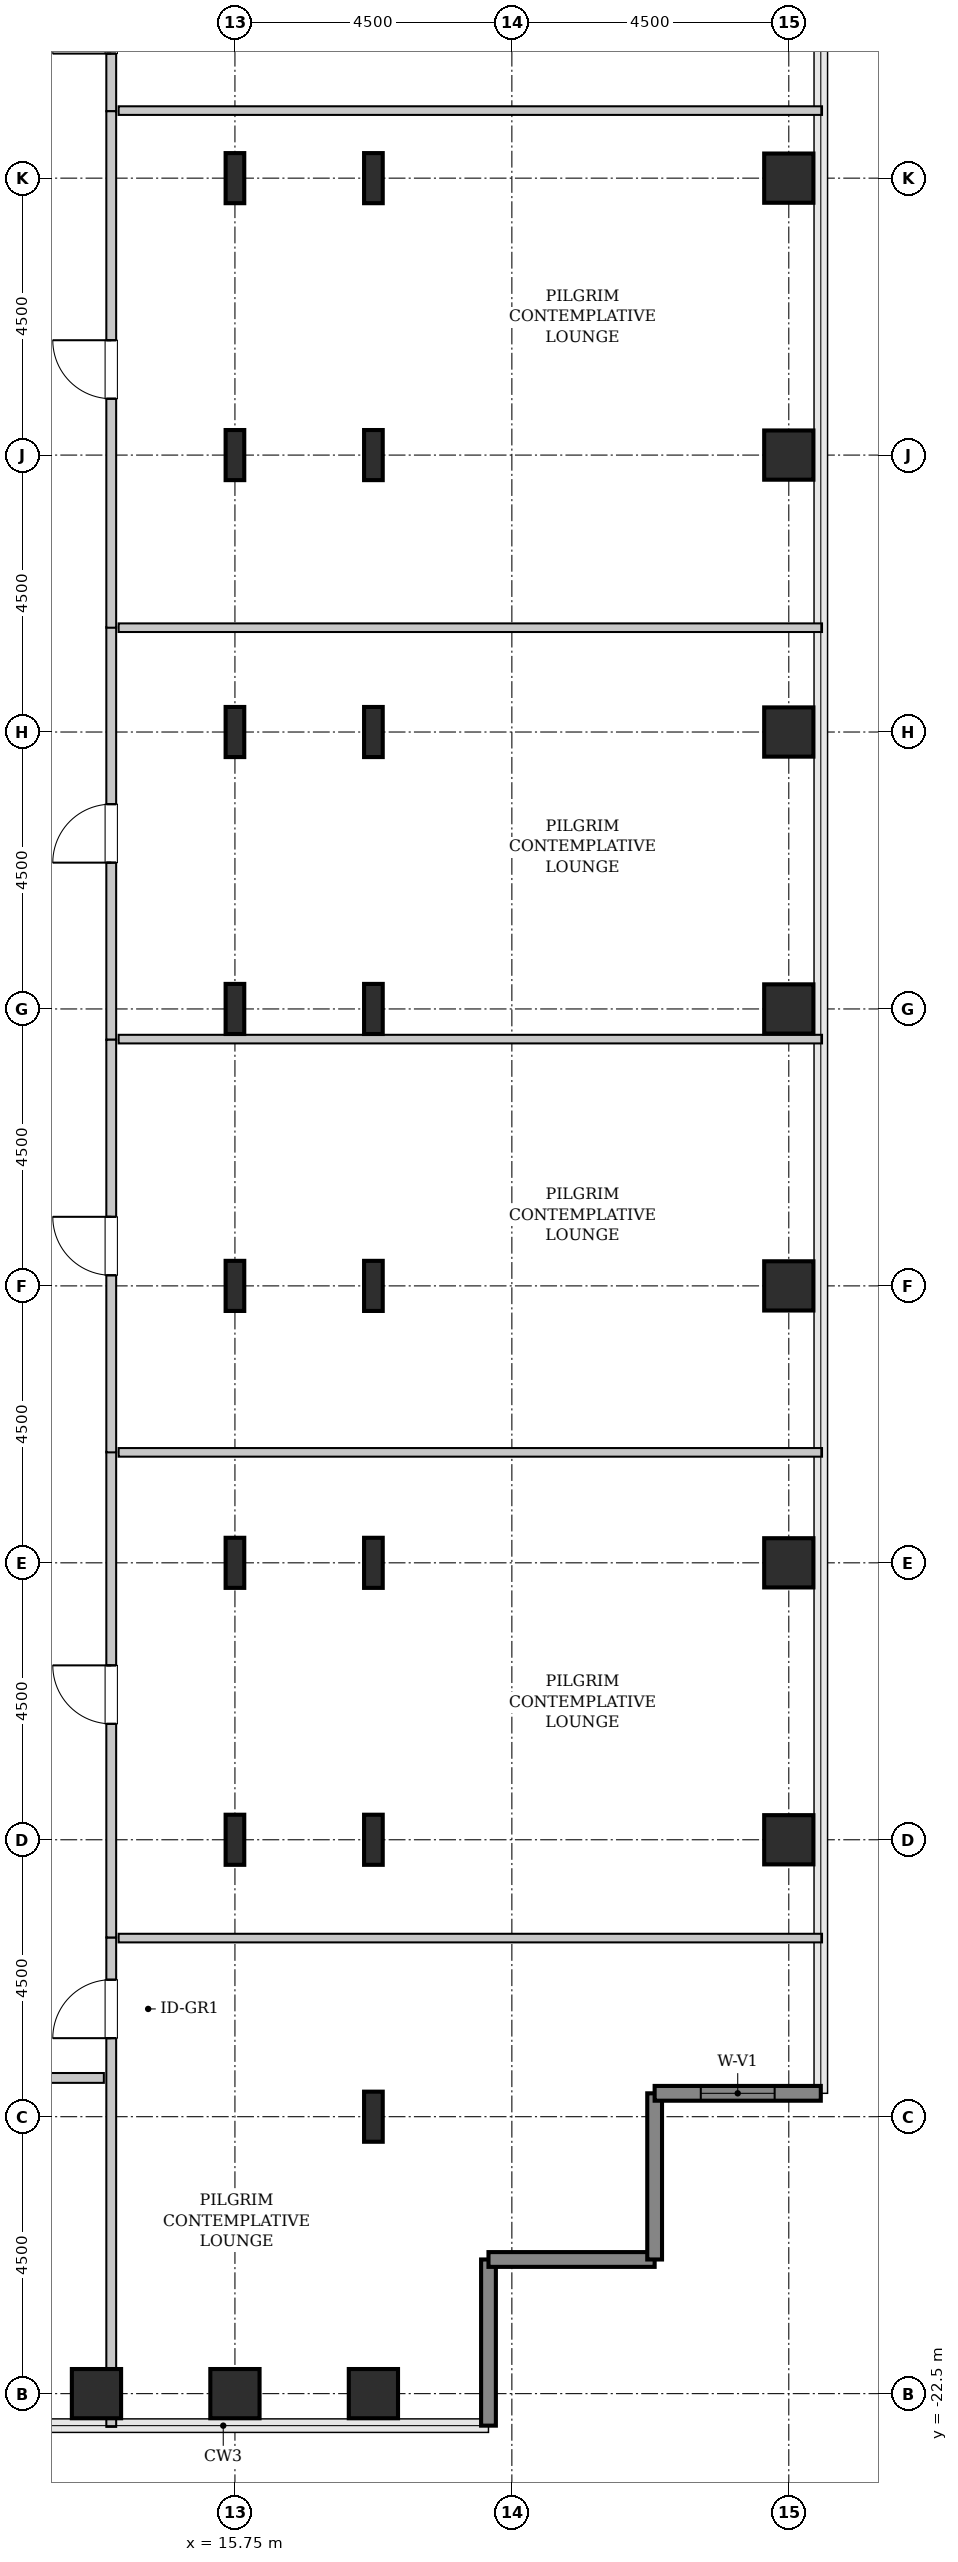
"""IFC4 building model, lengths in metres.
Left out: names, types, materials, properties, quantities, classifications, styles, units other than length and angle.
Written with IfcOpenShell. Run it as: python <this file> out.ifc"""

import sys

from ifc_helpers import new_model, si_unit, direction, frame, frame_2d, origin, origin_2d, place, context, subcontext, project, spatial, rectangle, hollow_rectangle, i_section, extrude, source, transform, mapped, element, fill, save


model = new_model("IFC4")
c1 = context("Model", 3, precision=1e-05, world=origin(), true_north=direction((0.0, 1.0)))
c2 = subcontext(c1, "Body", "Model", "MODEL_VIEW")
j1 = project(units=[si_unit("LENGTHUNIT", "METRE"), si_unit("PLANEANGLEUNIT", "RADIAN")], contexts=[c1])
p1 = place(None, origin())
s1 = spatial("IfcSite", under=j1, at=p1, CompositionType="ELEMENT")
p2 = place(p1, origin())
s2 = spatial("IfcBuilding", under=s1, at=p2, CompositionType="ELEMENT")
p3 = place(p2, frame((0.0, 0.0, 167.8)))
s3 = spatial("IfcBuildingStorey", under=s2, at=p3, CompositionType="ELEMENT", Elevation=167.8)
m1 = source(origin(), c2, "Body", "SweptSolid", [
    extrude(hollow_rectangle(XDim=0.8, YDim=0.8, WallThickness=0.04, InnerFilletRadius=0.04, OuterFilletRadius=0.08, at=origin_2d()), origin(), (0.0, 0.0, 1.0), 3.8),
])
for number, where, z_axis, x_axis in (
    (1, (13.5, -22.5, 0.0), (0.0, 0.0, 1.0), (1.0, 0.0, 0.0)),
    (2, (15.75, -22.5, 0.0), (0.0, 0.0, 1.0), (1.0, 0.0, 0.0)),
):
    element("IfcColumn", number, at=place(p3, frame(where, z_axis=z_axis, x_axis=x_axis)), inside=s3, PredefinedType="COLUMN", context=c2, shape_type="MappedRepresentation", body=[
        mapped(m1, transform((0.0, 0.0, 0.0), x_axis=(1.0, 0.0, 0.0), y_axis=(0.0, 1.0, 0.0), z_axis=(0.0, 0.0, 1.0), scale=1.0)),
    ])
m2 = source(origin(), c2, "Body", "SweptSolid", [
    extrude(i_section(OverallWidth=0.303, OverallDepth=0.814, WebThickness=0.021, FlangeThickness=0.04, FilletRadius=0.03, at=origin_2d()), origin(), (0.0, 0.0, 1.0), 3.8),
])
for number, where, z_axis, x_axis in (
    (3, (15.75, -13.5, 0.0), (0.0, 0.0, 1.0), (1.0, 0.0, 0.0)),
    (4, (15.75, -9.0, 0.0), (0.0, 0.0, 1.0), (1.0, 0.0, 0.0)),
    (5, (15.75, -4.5, 0.0), (0.0, 0.0, 1.0), (1.0, 0.0, 0.0)),
    (6, (15.75, 0.0, 0.0), (0.0, 0.0, 1.0), (1.0, 0.0, 0.0)),
    (7, (15.75, 4.5, 0.0), (0.0, 0.0, 1.0), (1.0, 0.0, 0.0)),
    (8, (15.75, 9.0, 0.0), (0.0, 0.0, 1.0), (1.0, 0.0, 0.0)),
    (9, (15.75, 13.5, 0.0), (0.0, 0.0, 1.0), (1.0, 0.0, 0.0)),
):
    element("IfcColumn", number, at=place(p3, frame(where, z_axis=z_axis, x_axis=x_axis)), inside=s3, PredefinedType="COLUMN", context=c2, shape_type="MappedRepresentation", body=[
        mapped(m2, transform((0.0, 0.0, 0.0), x_axis=(1.0, 0.0, 0.0), y_axis=(0.0, 1.0, 0.0), z_axis=(0.0, 0.0, 1.0), scale=1.0)),
    ])
p4 = place(p3, frame((18.0, -22.5, 0.0), z_axis=(0.0, 0.0, 1.0), x_axis=(1.0, 0.0, 0.0)))
e10 = element("IfcColumn", 10, at=p4, inside=s3, PredefinedType="COLUMN", context=c2, shape_type="MappedRepresentation", body=[
    mapped(m1, transform((0.0, 0.0, 0.0), x_axis=(1.0, 0.0, 0.0), y_axis=(0.0, 1.0, 0.0), z_axis=(0.0, 0.0, 1.0), scale=1.0)),
])
for number, where, z_axis, x_axis in (
    (11, (18.0, -18.0, 0.0), (0.0, 0.0, 1.0), (1.0, 0.0, 0.0)),
    (12, (18.0, -13.5, 0.0), (0.0, 0.0, 1.0), (1.0, 0.0, 0.0)),
    (13, (18.0, -9.0, 0.0), (0.0, 0.0, 1.0), (1.0, 0.0, 0.0)),
    (14, (18.0, -4.5, 0.0), (0.0, 0.0, 1.0), (1.0, 0.0, 0.0)),
    (15, (18.0, 0.0, 0.0), (0.0, 0.0, 1.0), (1.0, 0.0, 0.0)),
    (16, (18.0, 4.5, 0.0), (0.0, 0.0, 1.0), (1.0, 0.0, 0.0)),
    (17, (18.0, 9.0, 0.0), (0.0, 0.0, 1.0), (1.0, 0.0, 0.0)),
    (18, (18.0, 13.5, 0.0), (0.0, 0.0, 1.0), (1.0, 0.0, 0.0)),
):
    element("IfcColumn", number, at=place(p3, frame(where, z_axis=z_axis, x_axis=x_axis)), inside=s3, PredefinedType="COLUMN", context=c2, shape_type="MappedRepresentation", body=[
        mapped(m2, transform((0.0, 0.0, 0.0), x_axis=(1.0, 0.0, 0.0), y_axis=(0.0, 1.0, 0.0), z_axis=(0.0, 0.0, 1.0), scale=1.0)),
    ])
for number, where, z_axis, x_axis in (
    (19, (24.75, -13.5, 0.0), (0.0, 0.0, 1.0), (1.0, 0.0, 0.0)),
    (20, (24.75, -9.0, 0.0), (0.0, 0.0, 1.0), (1.0, 0.0, 0.0)),
    (21, (24.75, -4.5, 0.0), (0.0, 0.0, 1.0), (1.0, 0.0, 0.0)),
    (22, (24.75, 0.0, 0.0), (0.0, 0.0, 1.0), (1.0, 0.0, 0.0)),
    (23, (24.75, 4.5, 0.0), (0.0, 0.0, 1.0), (1.0, 0.0, 0.0)),
    (24, (24.75, 9.0, 0.0), (0.0, 0.0, 1.0), (1.0, 0.0, 0.0)),
    (25, (24.75, 13.5, 0.0), (0.0, 0.0, 1.0), (1.0, 0.0, 0.0)),
):
    element("IfcColumn", number, at=place(p3, frame(where, z_axis=z_axis, x_axis=x_axis)), inside=s3, PredefinedType="COLUMN", context=c2, shape_type="MappedRepresentation", body=[
        mapped(m1, transform((0.0, 0.0, 0.0), x_axis=(1.0, 0.0, 0.0), y_axis=(0.0, 1.0, 0.0), z_axis=(0.0, 0.0, 1.0), scale=1.0)),
    ])
m3 = source(origin(), c2, "Body", "SweptSolid", [
    extrude(rectangle(XDim=2.7, YDim=0.24, at=frame_2d((1.35, 0.0))), origin(), (0.0, 0.0, 1.0), 3.55),
])
for number, where, z_axis, x_axis in (
    (26, (19.87, -23.02, 0.0), (0.0, 0.0, 1.0), (0.0, 1.0, 0.0)),
    (27, (19.87, -20.32, 0.0), (0.0, 0.0, 1.0), (1.0, 0.0, 0.0)),
    (28, (22.57, -20.32, 0.0), (0.0, 0.0, 1.0), (0.0, 1.0, 0.0)),
):
    element("IfcWall", number, at=place(p3, frame(where, z_axis=z_axis, x_axis=x_axis)), inside=s3, PredefinedType="SHEAR", context=c2, shape_type="MappedRepresentation", body=[
        mapped(m3, transform((0.0, 0.0, 0.0), x_axis=(1.0, 0.0, 0.0), y_axis=(0.0, 1.0, 0.0), z_axis=(0.0, 0.0, 1.0), scale=1.0)),
    ])
p5 = place(p3, frame((22.57, -17.62, 0.0), z_axis=(0.0, 0.0, 1.0), x_axis=(1.0, 0.0, 0.0)))
e29 = element("IfcWall", 29, at=p5, inside=s3, PredefinedType="SHEAR", context=c2, shape_type="MappedRepresentation", body=[
    mapped(m3, transform((0.0, 0.0, 0.0), x_axis=(1.0, 0.0, 0.0), y_axis=(0.0, 1.0, 0.0), z_axis=(0.0, 0.0, 1.0), scale=1.0)),
])
p6 = place(p5, frame((0.75, 0.0, 0.85)))
e30 = element("IfcOpeningElement", 30, at=p6, cuts=e29, PredefinedType="OPENING", context=c2, shape_type="SweptSolid", body=[
    extrude(rectangle(XDim=1.2, YDim=1.8, at=frame_2d((0.6, 0.9))), frame((0.0, 0.13, 0.0), z_axis=(0.0, -1.0, 0.0), x_axis=(1.0, 0.0, 0.0)), (0.0, 0.0, 1.0), 0.26),
])
m4 = source(origin(), c2, "Body", "SweptSolid", [
    extrude(rectangle(XDim=7.953, YDim=0.16, at=frame_2d((3.976, 0.0))), origin(), (0.0, 0.0, 1.0), 3.535),
])
p7 = place(p3, frame((13.74, -23.04, 0.0), z_axis=(0.0, 0.0, 1.0), x_axis=(0.0, 1.0, 0.0)))
e31 = element("IfcWall", 31, at=p7, inside=s3, PredefinedType="PARTITIONING", context=c2, shape_type="MappedRepresentation", body=[
    mapped(m4, transform((0.0, 0.0, 0.0), x_axis=(1.0, 0.0, 0.0), y_axis=(0.0, 1.0, 0.0), z_axis=(0.0, 0.0, 1.0), scale=1.0)),
])
p8 = place(p7, frame((6.316, 0.0, 0.0)))
e32 = element("IfcOpeningElement", 32, at=p8, cuts=e31, PredefinedType="OPENING", context=c2, shape_type="SweptSolid", body=[
    extrude(rectangle(XDim=0.95, YDim=2.1, at=frame_2d((0.475, 1.05))), frame((0.0, 0.09, 0.0), z_axis=(0.0, -1.0, 0.0), x_axis=(1.0, 0.0, 0.0)), (0.0, 0.0, 1.0), 0.18),
])
m5 = source(origin(), c2, "Body", "SweptSolid", [
    extrude(rectangle(XDim=11.43, YDim=0.14, at=frame_2d((5.715, 0.0))), origin(), (0.0, 0.0, 1.0), 3.535),
])
p9 = place(p3, frame((13.86, -15.097, 0.0), z_axis=(0.0, 0.0, 1.0), x_axis=(1.0, 0.0, 0.0)))
e33 = element("IfcWall", 33, at=p9, inside=s3, PredefinedType="PARTITIONING", context=c2, shape_type="MappedRepresentation", body=[
    mapped(m5, transform((0.0, 0.0, 0.0), x_axis=(1.0, 0.0, 0.0), y_axis=(0.0, 1.0, 0.0), z_axis=(0.0, 0.0, 1.0), scale=1.0)),
])
m6 = source(origin(), c2, "Body", "SweptSolid", [
    extrude(rectangle(XDim=7.892, YDim=0.16, at=frame_2d((3.946, 0.0))), origin(), (0.0, 0.0, 1.0), 3.535),
])
p10 = place(p3, frame((13.74, -15.087, 0.0), z_axis=(0.0, 0.0, 1.0), x_axis=(0.0, 1.0, 0.0)))
e34 = element("IfcWall", 34, at=p10, inside=s3, PredefinedType="PARTITIONING", context=c2, shape_type="MappedRepresentation", body=[
    mapped(m6, transform((0.0, 0.0, 0.0), x_axis=(1.0, 0.0, 0.0), y_axis=(0.0, 1.0, 0.0), z_axis=(0.0, 0.0, 1.0), scale=1.0)),
])
p11 = place(p10, frame((3.471, 0.0, 0.0)))
e35 = element("IfcOpeningElement", 35, at=p11, cuts=e34, PredefinedType="OPENING", context=c2, shape_type="SweptSolid", body=[
    extrude(rectangle(XDim=0.95, YDim=2.1, at=frame_2d((0.475, 1.05))), frame((0.0, 0.09, 0.0), z_axis=(0.0, -1.0, 0.0), x_axis=(1.0, 0.0, 0.0)), (0.0, 0.0, 1.0), 0.18),
])
p12 = place(p3, frame((13.86, -7.205, 0.0), z_axis=(0.0, 0.0, 1.0), x_axis=(1.0, 0.0, 0.0)))
e36 = element("IfcWall", 36, at=p12, inside=s3, PredefinedType="PARTITIONING", context=c2, shape_type="MappedRepresentation", body=[
    mapped(m5, transform((0.0, 0.0, 0.0), x_axis=(1.0, 0.0, 0.0), y_axis=(0.0, 1.0, 0.0), z_axis=(0.0, 0.0, 1.0), scale=1.0)),
])
m7 = source(origin(), c2, "Body", "SweptSolid", [
    extrude(rectangle(XDim=6.705, YDim=0.16, at=frame_2d((3.353, 0.0))), origin(), (0.0, 0.0, 1.0), 3.535),
])
p13 = place(p3, frame((13.74, -0.5, 0.0), z_axis=(0.0, 0.0, 1.0), x_axis=(0.0, 1.0, 0.0)))
e37 = element("IfcWall", 37, at=p13, inside=s3, PredefinedType="PARTITIONING", context=c2, shape_type="MappedRepresentation", body=[
    mapped(m7, transform((0.0, 0.0, 0.0), x_axis=(1.0, 0.0, 0.0), y_axis=(0.0, 1.0, 0.0), z_axis=(0.0, 0.0, 1.0), scale=1.0)),
])
p14 = place(p13, frame((2.877, 0.0, 0.0)))
e38 = element("IfcOpeningElement", 38, at=p14, cuts=e37, PredefinedType="OPENING", context=c2, shape_type="SweptSolid", body=[
    extrude(rectangle(XDim=0.95, YDim=2.1, at=frame_2d((0.475, 1.05))), frame((0.0, 0.09, 0.0), z_axis=(0.0, -1.0, 0.0), x_axis=(1.0, 0.0, 0.0)), (0.0, 0.0, 1.0), 0.18),
])
p15 = place(p3, frame((13.86, 6.195, 0.0), z_axis=(0.0, 0.0, 1.0), x_axis=(1.0, 0.0, 0.0)))
e39 = element("IfcWall", 39, at=p15, inside=s3, PredefinedType="PARTITIONING", context=c2, shape_type="MappedRepresentation", body=[
    mapped(m5, transform((0.0, 0.0, 0.0), x_axis=(1.0, 0.0, 0.0), y_axis=(0.0, 1.0, 0.0), z_axis=(0.0, 0.0, 1.0), scale=1.0)),
])
m8 = source(origin(), c2, "Body", "SweptSolid", [
    extrude(rectangle(XDim=11.43, YDim=0.14, at=frame_2d((5.715, 0.0))), origin(), (0.0, 0.0, 1.0), 2.875),
])
p16 = place(p3, frame((13.86, -0.49, 0.0), z_axis=(0.0, 0.0, 1.0), x_axis=(1.0, 0.0, 0.0)))
e40 = element("IfcWall", 40, at=p16, inside=s3, PredefinedType="PARTITIONING", context=c2, shape_type="MappedRepresentation", body=[
    mapped(m8, transform((0.0, 0.0, 0.0), x_axis=(1.0, 0.0, 0.0), y_axis=(0.0, 1.0, 0.0), z_axis=(0.0, 0.0, 1.0), scale=1.0)),
])
p17 = place(p3, frame((13.74, -7.205, 0.0), z_axis=(0.0, 0.0, 1.0), x_axis=(0.0, 1.0, 0.0)))
e41 = element("IfcWall", 41, at=p17, inside=s3, PredefinedType="PARTITIONING", context=c2, shape_type="MappedRepresentation", body=[
    mapped(m7, transform((0.0, 0.0, 0.0), x_axis=(1.0, 0.0, 0.0), y_axis=(0.0, 1.0, 0.0), z_axis=(0.0, 0.0, 1.0), scale=1.0)),
])
p18 = place(p17, frame((2.877, 0.0, 0.0)))
e42 = element("IfcOpeningElement", 42, at=p18, cuts=e41, PredefinedType="OPENING", context=c2, shape_type="SweptSolid", body=[
    extrude(rectangle(XDim=0.95, YDim=2.1, at=frame_2d((0.475, 1.05))), frame((0.0, 0.09, 0.0), z_axis=(0.0, -1.0, 0.0), x_axis=(1.0, 0.0, 0.0)), (0.0, 0.0, 1.0), 0.18),
])
m9 = source(origin(), c2, "Body", "SweptSolid", [
    extrude(rectangle(XDim=8.453, YDim=0.16, at=frame_2d((4.226, 0.0))), origin(), (0.0, 0.0, 1.0), 3.535),
])
p19 = place(p3, frame((13.74, 14.587, 0.0), z_axis=(0.0, 0.0, 1.0), x_axis=(0.0, 1.0, 0.0)))
e43 = element("IfcWall", 43, at=p19, inside=s3, PredefinedType="PARTITIONING", context=c2, shape_type="MappedRepresentation", body=[
    mapped(m9, transform((0.0, 0.0, 0.0), x_axis=(1.0, 0.0, 0.0), y_axis=(0.0, 1.0, 0.0), z_axis=(0.0, 0.0, 1.0), scale=1.0)),
])
p20 = place(p19, frame((0.936, 0.0, 0.0)))
e44 = element("IfcOpeningElement", 44, at=p20, cuts=e43, PredefinedType="OPENING", context=c2, shape_type="SweptSolid", body=[
    extrude(rectangle(XDim=0.95, YDim=2.1, at=frame_2d((0.475, 1.05))), frame((0.0, 0.09, 0.0), z_axis=(0.0, -1.0, 0.0), x_axis=(1.0, 0.0, 0.0)), (0.0, 0.0, 1.0), 0.18),
])
p21 = place(p3, frame((13.86, 14.597, 0.0), z_axis=(0.0, 0.0, 1.0), x_axis=(1.0, 0.0, 0.0)))
e45 = element("IfcWall", 45, at=p21, inside=s3, PredefinedType="PARTITIONING", context=c2, shape_type="MappedRepresentation", body=[
    mapped(m5, transform((0.0, 0.0, 0.0), x_axis=(1.0, 0.0, 0.0), y_axis=(0.0, 1.0, 0.0), z_axis=(0.0, 0.0, 1.0), scale=1.0)),
])
m10 = source(origin(), c2, "Body", "SweptSolid", [
    extrude(rectangle(XDim=8.392, YDim=0.16, at=frame_2d((4.196, 0.0))), origin(), (0.0, 0.0, 1.0), 3.535),
])
p22 = place(p3, frame((13.74, 6.195, 0.0), z_axis=(0.0, 0.0, 1.0), x_axis=(0.0, 1.0, 0.0)))
e46 = element("IfcWall", 46, at=p22, inside=s3, PredefinedType="PARTITIONING", context=c2, shape_type="MappedRepresentation", body=[
    mapped(m10, transform((0.0, 0.0, 0.0), x_axis=(1.0, 0.0, 0.0), y_axis=(0.0, 1.0, 0.0), z_axis=(0.0, 0.0, 1.0), scale=1.0)),
])
p23 = place(p22, frame((3.721, 0.0, 0.0)))
e47 = element("IfcOpeningElement", 47, at=p23, cuts=e46, PredefinedType="OPENING", context=c2, shape_type="SweptSolid", body=[
    extrude(rectangle(XDim=0.95, YDim=2.1, at=frame_2d((0.475, 1.05))), frame((0.0, 0.09, 0.0), z_axis=(0.0, -1.0, 0.0), x_axis=(1.0, 0.0, 0.0)), (0.0, 0.0, 1.0), 0.18),
])
m11 = source(origin(), c2, "Body", "SweptSolid", [
    extrude(rectangle(XDim=6.025, YDim=0.16, at=frame_2d((3.013, 0.0))), origin(), (0.0, 0.0, 1.0), 3.535),
])
p24 = place(p3, frame((7.595, -17.37, 0.0), z_axis=(0.0, 0.0, 1.0), x_axis=(1.0, 0.0, 0.0)))
e48 = element("IfcWall", 48, at=p24, inside=s3, PredefinedType="PARTITIONING", context=c2, shape_type="MappedRepresentation", body=[
    mapped(m11, transform((0.0, 0.0, 0.0), x_axis=(1.0, 0.0, 0.0), y_axis=(0.0, 1.0, 0.0), z_axis=(0.0, 0.0, 1.0), scale=1.0)),
])
p25 = place(p24, frame((2.176, 0.0, 0.0)))
e49 = element("IfcOpeningElement", 49, at=p25, cuts=e48, PredefinedType="OPENING", context=c2, shape_type="SweptSolid", body=[
    extrude(rectangle(XDim=0.95, YDim=2.1, at=frame_2d((0.475, 1.05))), frame((0.0, 0.09, 0.0), z_axis=(0.0, -1.0, 0.0), x_axis=(1.0, 0.0, 0.0)), (0.0, 0.0, 1.0), 0.18),
])
m12 = source(origin(), c2, "Body", "SweptSolid", [
    extrude(rectangle(XDim=1.2, YDim=1.8, at=frame_2d((0.6, 0.9))), frame((0.0, 0.03, 0.0), z_axis=(0.0, -1.0, 0.0), x_axis=(1.0, 0.0, 0.0)), (0.0, 0.0, 1.0), 0.06),
])
p26 = place(p6, origin())
e50 = element("IfcWindow", 50, at=p26, inside=s3, PartitioningType="SINGLE_PANEL", PredefinedType="WINDOW", context=c2, shape_type="MappedRepresentation", body=[
    mapped(m12, transform((0.0, 0.0, 0.0), x_axis=(1.0, 0.0, 0.0), y_axis=(0.0, 1.0, 0.0), z_axis=(0.0, 0.0, 1.0), scale=1.0)),
])
fill(e30, e50)
m13 = source(origin(), c2, "Body", "SweptSolid", [
    extrude(rectangle(XDim=0.95, YDim=2.1, at=frame_2d((0.475, 1.05))), frame((0.0, 0.025, 0.0), z_axis=(0.0, -1.0, 0.0), x_axis=(1.0, 0.0, 0.0)), (0.0, 0.0, 1.0), 0.05),
])
p27 = place(p8, origin())
e51 = element("IfcDoor", 51, at=p27, inside=s3, OperationType="SINGLE_SWING_LEFT", PredefinedType="DOOR", context=c2, shape_type="MappedRepresentation", body=[
    mapped(m13, transform((0.0, 0.0, 0.0), x_axis=(1.0, 0.0, 0.0), y_axis=(0.0, 1.0, 0.0), z_axis=(0.0, 0.0, 1.0), scale=1.0)),
])
fill(e32, e51)
p28 = place(p11, origin())
e52 = element("IfcDoor", 52, at=p28, inside=s3, OperationType="SINGLE_SWING_RIGHT", PredefinedType="DOOR", context=c2, shape_type="MappedRepresentation", body=[
    mapped(m13, transform((0.0, 0.0, 0.0), x_axis=(1.0, 0.0, 0.0), y_axis=(0.0, 1.0, 0.0), z_axis=(0.0, 0.0, 1.0), scale=1.0)),
])
fill(e35, e52)
p29 = place(p14, origin())
e53 = element("IfcDoor", 53, at=p29, inside=s3, OperationType="SINGLE_SWING_LEFT", PredefinedType="DOOR", context=c2, shape_type="MappedRepresentation", body=[
    mapped(m13, transform((0.0, 0.0, 0.0), x_axis=(1.0, 0.0, 0.0), y_axis=(0.0, 1.0, 0.0), z_axis=(0.0, 0.0, 1.0), scale=1.0)),
])
fill(e38, e53)
p30 = place(p18, origin())
e54 = element("IfcDoor", 54, at=p30, inside=s3, OperationType="SINGLE_SWING_RIGHT", PredefinedType="DOOR", context=c2, shape_type="MappedRepresentation", body=[
    mapped(m13, transform((0.0, 0.0, 0.0), x_axis=(1.0, 0.0, 0.0), y_axis=(0.0, 1.0, 0.0), z_axis=(0.0, 0.0, 1.0), scale=1.0)),
])
fill(e42, e54)
p31 = place(p20, origin())
e55 = element("IfcDoor", 55, at=p31, inside=s3, OperationType="SINGLE_SWING_LEFT", PredefinedType="DOOR", context=c2, shape_type="MappedRepresentation", body=[
    mapped(m13, transform((0.0, 0.0, 0.0), x_axis=(1.0, 0.0, 0.0), y_axis=(0.0, 1.0, 0.0), z_axis=(0.0, 0.0, 1.0), scale=1.0)),
])
fill(e44, e55)
p32 = place(p23, origin())
e56 = element("IfcDoor", 56, at=p32, inside=s3, OperationType="SINGLE_SWING_RIGHT", PredefinedType="DOOR", context=c2, shape_type="MappedRepresentation", body=[
    mapped(m13, transform((0.0, 0.0, 0.0), x_axis=(1.0, 0.0, 0.0), y_axis=(0.0, 1.0, 0.0), z_axis=(0.0, 0.0, 1.0), scale=1.0)),
])
fill(e47, e56)
save(model, sys.argv[1])
